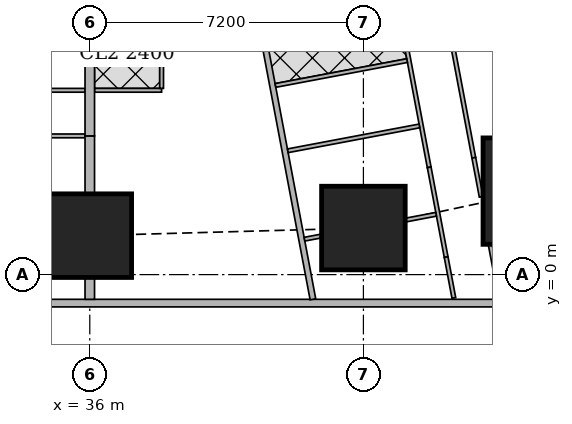
"""IFC4 building model, lengths in metres.
Left out: names, types, materials, properties, quantities, classifications, styles, units other than length and angle.
Written with IfcOpenShell. Run it as: python <this file> out.ifc"""

import sys

from ifc_helpers import new_model, si_unit, direction, frame, frame_2d, origin, origin_2d, place, context, subcontext, project, spatial, rectangle, extrude, element, fill, save


model = new_model("IFC4")
c1 = context("Model", 3, precision=1e-05, world=origin(), true_north=direction((0.0, 1.0)))
c2 = subcontext(c1, "Body", "Model", "MODEL_VIEW")
j1 = project(units=[si_unit("LENGTHUNIT", "METRE"), si_unit("PLANEANGLEUNIT", "RADIAN")], contexts=[c1])
p1 = place(None, origin())
s1 = spatial("IfcSite", under=j1, at=p1, CompositionType="ELEMENT")
p2 = place(p1, origin())
s2 = spatial("IfcBuilding", under=s1, at=p2, CompositionType="ELEMENT")
p3 = place(p2, frame((0.0, 0.0, 89.15)))
s3 = spatial("IfcBuildingStorey", under=s2, at=p3, CompositionType="ELEMENT", Elevation=89.15)
for number, where, z_axis, x_axis in (
    (1, (36.0, 1.025, 0.0), (0.0, 0.0, 1.0), (1.0, 0.0, 0.0)),
    (2, (43.2, 1.225, 0.0), (0.0, 0.0, 1.0), (1.0, 0.0, 0.0)),
):
    element("IfcColumn", number, at=place(p3, frame(where, z_axis=z_axis, x_axis=x_axis)), inside=s3, PredefinedType="COLUMN", context=c2, shape_type="SweptSolid", body=[
        extrude(rectangle(XDim=2.2, YDim=2.2, at=origin_2d()), origin(), (0.0, 0.0, 1.0), 3.75),
    ])
p4 = place(p3, frame((47.748, 2.197, 0.0), z_axis=(0.0, 0.0, 1.0), x_axis=(1.0, 0.0, 0.0)))
e3 = element("IfcColumn", 3, at=p4, inside=s3, PredefinedType="COLUMN", context=c2, shape_type="SweptSolid", body=[
    extrude(rectangle(XDim=2.8, YDim=2.8, at=origin_2d()), origin(), (0.0, 0.0, 1.0), 3.75),
])
p5 = place(p3, frame((2.163, -0.75, 0.0), z_axis=(0.0, 0.0, 1.0), x_axis=(1.0, 0.0, 0.0)))
e4 = element("IfcWall", 4, at=p5, inside=s3, PredefinedType="SOLIDWALL", context=c2, shape_type="SweptSolid", body=[
    extrude(rectangle(XDim=45.628, YDim=0.2, at=frame_2d((22.814, 0.0))), origin(), (0.0, 0.0, 1.0), 3.5),
])
p6 = place(p5, frame((9.537, 0.0, 0.9)))
e5 = element("IfcOpeningElement", 5, at=p6, cuts=e4, PredefinedType="OPENING", context=c2, shape_type="SweptSolid", body=[
    extrude(rectangle(XDim=1.8, YDim=1.5, at=frame_2d((0.9, 0.75))), frame((0.0, 0.11, 0.0), z_axis=(0.0, -1.0, 0.0), x_axis=(1.0, 0.0, 0.0)), (0.0, 0.0, 1.0), 0.22),
])
p7 = place(p5, frame((13.137, 0.0, 0.9)))
e6 = element("IfcOpeningElement", 6, at=p7, cuts=e4, PredefinedType="OPENING", context=c2, shape_type="SweptSolid", body=[
    extrude(rectangle(XDim=1.8, YDim=1.5, at=frame_2d((0.9, 0.75))), frame((0.0, 0.11, 0.0), z_axis=(0.0, -1.0, 0.0), x_axis=(1.0, 0.0, 0.0)), (0.0, 0.0, 1.0), 0.22),
])
p8 = place(p5, frame((16.737, 0.0, 0.9)))
e7 = element("IfcOpeningElement", 7, at=p8, cuts=e4, PredefinedType="OPENING", context=c2, shape_type="SweptSolid", body=[
    extrude(rectangle(XDim=1.8, YDim=1.5, at=frame_2d((0.9, 0.75))), frame((0.0, 0.11, 0.0), z_axis=(0.0, -1.0, 0.0), x_axis=(1.0, 0.0, 0.0)), (0.0, 0.0, 1.0), 0.22),
])
p9 = place(p5, frame((20.337, 0.0, 0.9)))
e8 = element("IfcOpeningElement", 8, at=p9, cuts=e4, PredefinedType="OPENING", context=c2, shape_type="SweptSolid", body=[
    extrude(rectangle(XDim=1.8, YDim=1.5, at=frame_2d((0.9, 0.75))), frame((0.0, 0.11, 0.0), z_axis=(0.0, -1.0, 0.0), x_axis=(1.0, 0.0, 0.0)), (0.0, 0.0, 1.0), 0.22),
])
p10 = place(p5, frame((23.937, 0.0, 0.9)))
e9 = element("IfcOpeningElement", 9, at=p10, cuts=e4, PredefinedType="OPENING", context=c2, shape_type="SweptSolid", body=[
    extrude(rectangle(XDim=1.8, YDim=1.5, at=frame_2d((0.9, 0.75))), frame((0.0, 0.11, 0.0), z_axis=(0.0, -1.0, 0.0), x_axis=(1.0, 0.0, 0.0)), (0.0, 0.0, 1.0), 0.22),
])
p11 = place(p5, frame((27.537, 0.0, 0.9)))
e10 = element("IfcOpeningElement", 10, at=p11, cuts=e4, PredefinedType="OPENING", context=c2, shape_type="SweptSolid", body=[
    extrude(rectangle(XDim=1.8, YDim=1.5, at=frame_2d((0.9, 0.75))), frame((0.0, 0.11, 0.0), z_axis=(0.0, -1.0, 0.0), x_axis=(1.0, 0.0, 0.0)), (0.0, 0.0, 1.0), 0.22),
])
p12 = place(p5, frame((31.137, 0.0, 0.9)))
e11 = element("IfcOpeningElement", 11, at=p12, cuts=e4, PredefinedType="OPENING", context=c2, shape_type="SweptSolid", body=[
    extrude(rectangle(XDim=1.8, YDim=1.5, at=frame_2d((0.9, 0.75))), frame((0.0, 0.11, 0.0), z_axis=(0.0, -1.0, 0.0), x_axis=(1.0, 0.0, 0.0)), (0.0, 0.0, 1.0), 0.22),
])
p13 = place(p5, frame((34.737, 0.0, 0.9)))
e12 = element("IfcOpeningElement", 12, at=p13, cuts=e4, PredefinedType="OPENING", context=c2, shape_type="SweptSolid", body=[
    extrude(rectangle(XDim=1.8, YDim=1.5, at=frame_2d((0.9, 0.75))), frame((0.0, 0.11, 0.0), z_axis=(0.0, -1.0, 0.0), x_axis=(1.0, 0.0, 0.0)), (0.0, 0.0, 1.0), 0.22),
])
p14 = place(p3, frame((50.653, 2.703, 0.0), z_axis=(0.0, 0.0, 1.0), x_axis=(-0.185612026696, 0.982623109613, 0.0)))
e13 = element("IfcWall", 13, at=p14, inside=s3, PredefinedType="SOLIDWALL", context=c2, shape_type="SweptSolid", body=[
    extrude(rectangle(XDim=41.393, YDim=0.2, at=frame_2d((20.697, 0.0))), origin(), (0.0, 0.0, 1.0), 3.5),
])
p15 = place(p14, frame((1.633, 0.0, 0.9)))
e14 = element("IfcOpeningElement", 14, at=p15, cuts=e13, PredefinedType="OPENING", context=c2, shape_type="SweptSolid", body=[
    extrude(rectangle(XDim=1.8, YDim=1.5, at=frame_2d((0.9, 0.75))), frame((0.0, 0.11, 0.0), z_axis=(0.0, -1.0, 0.0), x_axis=(1.0, 0.0, 0.0)), (0.0, 0.0, 1.0), 0.22),
])
p16 = place(p14, frame((6.032, 0.0, 0.9)))
e15 = element("IfcOpeningElement", 15, at=p16, cuts=e13, PredefinedType="OPENING", context=c2, shape_type="SweptSolid", body=[
    extrude(rectangle(XDim=1.8, YDim=1.5, at=frame_2d((0.9, 0.75))), frame((0.0, 0.11, 0.0), z_axis=(0.0, -1.0, 0.0), x_axis=(1.0, 0.0, 0.0)), (0.0, 0.0, 1.0), 0.22),
])
p17 = place(p14, frame((9.848, 0.0, 0.9)))
e16 = element("IfcOpeningElement", 16, at=p17, cuts=e13, PredefinedType="OPENING", context=c2, shape_type="SweptSolid", body=[
    extrude(rectangle(XDim=1.8, YDim=1.5, at=frame_2d((0.9, 0.75))), frame((0.0, 0.11, 0.0), z_axis=(0.0, -1.0, 0.0), x_axis=(1.0, 0.0, 0.0)), (0.0, 0.0, 1.0), 0.22),
])
p18 = place(p14, frame((13.664, 0.0, 0.9)))
e17 = element("IfcOpeningElement", 17, at=p18, cuts=e13, PredefinedType="OPENING", context=c2, shape_type="SweptSolid", body=[
    extrude(rectangle(XDim=1.8, YDim=1.5, at=frame_2d((0.9, 0.75))), frame((0.0, 0.11, 0.0), z_axis=(0.0, -1.0, 0.0), x_axis=(1.0, 0.0, 0.0)), (0.0, 0.0, 1.0), 0.22),
])
p19 = place(p14, frame((17.481, 0.0, 0.9)))
e18 = element("IfcOpeningElement", 18, at=p19, cuts=e13, PredefinedType="OPENING", context=c2, shape_type="SweptSolid", body=[
    extrude(rectangle(XDim=1.8, YDim=1.5, at=frame_2d((0.9, 0.75))), frame((0.0, 0.11, 0.0), z_axis=(0.0, -1.0, 0.0), x_axis=(1.0, 0.0, 0.0)), (0.0, 0.0, 1.0), 0.22),
])
p20 = place(p14, frame((21.297, 0.0, 0.9)))
e19 = element("IfcOpeningElement", 19, at=p20, cuts=e13, PredefinedType="OPENING", context=c2, shape_type="SweptSolid", body=[
    extrude(rectangle(XDim=1.8, YDim=1.5, at=frame_2d((0.9, 0.75))), frame((0.0, 0.11, 0.0), z_axis=(0.0, -1.0, 0.0), x_axis=(1.0, 0.0, 0.0)), (0.0, 0.0, 1.0), 0.22),
])
p21 = place(p14, frame((25.113, 0.0, 0.9)))
e20 = element("IfcOpeningElement", 20, at=p21, cuts=e13, PredefinedType="OPENING", context=c2, shape_type="SweptSolid", body=[
    extrude(rectangle(XDim=1.8, YDim=1.5, at=frame_2d((0.9, 0.75))), frame((0.0, 0.11, 0.0), z_axis=(0.0, -1.0, 0.0), x_axis=(1.0, 0.0, 0.0)), (0.0, 0.0, 1.0), 0.22),
])
p22 = place(p14, frame((28.93, 0.0, 0.9)))
e21 = element("IfcOpeningElement", 21, at=p22, cuts=e13, PredefinedType="OPENING", context=c2, shape_type="SweptSolid", body=[
    extrude(rectangle(XDim=1.8, YDim=1.5, at=frame_2d((0.9, 0.75))), frame((0.0, 0.11, 0.0), z_axis=(0.0, -1.0, 0.0), x_axis=(1.0, 0.0, 0.0)), (0.0, 0.0, 1.0), 0.22),
])
p23 = place(p14, frame((32.746, 0.0, 0.9)))
e22 = element("IfcOpeningElement", 22, at=p23, cuts=e13, PredefinedType="OPENING", context=c2, shape_type="SweptSolid", body=[
    extrude(rectangle(XDim=1.8, YDim=1.5, at=frame_2d((0.9, 0.75))), frame((0.0, 0.11, 0.0), z_axis=(0.0, -1.0, 0.0), x_axis=(1.0, 0.0, 0.0)), (0.0, 0.0, 1.0), 0.22),
])
p24 = place(p14, frame((36.481, 0.0, 0.9)))
e23 = element("IfcOpeningElement", 23, at=p24, cuts=e13, PredefinedType="OPENING", context=c2, shape_type="SweptSolid", body=[
    extrude(rectangle(XDim=1.8, YDim=1.5, at=frame_2d((0.9, 0.75))), frame((0.0, 0.11, 0.0), z_axis=(0.0, -1.0, 0.0), x_axis=(1.0, 0.0, 0.0)), (0.0, 0.0, 1.0), 0.22),
])
p25 = place(p3, frame((33.127, 45.65, 0.0), z_axis=(0.0, 0.0, 1.0), x_axis=(0.185598547723, -0.98262565562, 0.0)))
e24 = element("IfcWall", 24, at=p25, inside=s3, PredefinedType="SOLIDWALL", context=c2, shape_type="SweptSolid", body=[
    extrude(rectangle(XDim=47.118, YDim=0.15, at=frame_2d((23.559, 0.0))), origin(), (0.0, 0.0, 1.0), 2.2),
])
p26 = place(p25, frame((15.285, 0.0, 0.0)))
e25 = element("IfcOpeningElement", 25, at=p26, cuts=e24, PredefinedType="OPENING", context=c2, shape_type="SweptSolid", body=[
    extrude(rectangle(XDim=1.0, YDim=2.1, at=frame_2d((0.5, 1.05))), frame((0.0, 0.085, 0.0), z_axis=(0.0, -1.0, 0.0), x_axis=(1.0, 0.0, 0.0)), (0.0, 0.0, 1.0), 0.17),
])
p27 = place(p25, frame((19.102, 0.0, 0.0)))
e26 = element("IfcOpeningElement", 26, at=p27, cuts=e24, PredefinedType="OPENING", context=c2, shape_type="SweptSolid", body=[
    extrude(rectangle(XDim=1.0, YDim=2.1, at=frame_2d((0.5, 1.05))), frame((0.0, 0.085, 0.0), z_axis=(0.0, -1.0, 0.0), x_axis=(1.0, 0.0, 0.0)), (0.0, 0.0, 1.0), 0.17),
])
p28 = place(p25, frame((33.88, 0.0, 0.0)))
e27 = element("IfcOpeningElement", 27, at=p28, cuts=e24, PredefinedType="OPENING", context=c2, shape_type="SweptSolid", body=[
    extrude(rectangle(XDim=1.0, YDim=2.1, at=frame_2d((0.5, 1.05))), frame((0.0, 0.085, 0.0), z_axis=(0.0, -1.0, 0.0), x_axis=(1.0, 0.0, 0.0)), (0.0, 0.0, 1.0), 0.17),
])
p29 = place(p3, frame((35.875, 3.65, 0.0), z_axis=(0.0, 0.0, 1.0), x_axis=(-1.0, 0.0, 0.0)))
e28 = element("IfcWall", 28, at=p29, inside=s3, PredefinedType="PARTITIONING", context=c2, shape_type="SweptSolid", body=[
    extrude(rectangle(XDim=7.075, YDim=0.1, at=frame_2d((3.538, 0.0))), origin(), (0.0, 0.0, 1.0), 3.5),
])
p30 = place(p29, frame((5.975, 0.0, 0.0)))
e29 = element("IfcOpeningElement", 29, at=p30, cuts=e28, PredefinedType="OPENING", context=c2, shape_type="SweptSolid", body=[
    extrude(rectangle(XDim=0.9, YDim=2.1, at=frame_2d((0.45, 1.05))), frame((0.0, 0.06, 0.0), z_axis=(0.0, -1.0, 0.0), x_axis=(1.0, 0.0, 0.0)), (0.0, 0.0, 1.0), 0.12),
])
p31 = place(p29, frame((2.375, 0.0, 0.0)))
e30 = element("IfcOpeningElement", 30, at=p31, cuts=e28, PredefinedType="OPENING", context=c2, shape_type="SweptSolid", body=[
    extrude(rectangle(XDim=0.9, YDim=2.1, at=frame_2d((0.45, 1.05))), frame((0.0, 0.06, 0.0), z_axis=(0.0, -1.0, 0.0), x_axis=(1.0, 0.0, 0.0)), (0.0, 0.0, 1.0), 0.12),
])
p32 = place(p3, frame((35.875, 4.85, 0.0), z_axis=(0.0, 0.0, 1.0), x_axis=(-1.0, 0.0, 0.0)))
e31 = element("IfcWall", 31, at=p32, inside=s3, PredefinedType="PARTITIONING", context=c2, shape_type="SweptSolid", body=[
    extrude(rectangle(XDim=7.075, YDim=0.1, at=frame_2d((3.538, 0.0))), origin(), (0.0, 0.0, 1.0), 3.5),
])
p33 = place(p32, frame((5.6, 0.0, 0.0)))
e32 = element("IfcOpeningElement", 32, at=p33, cuts=e31, PredefinedType="OPENING", context=c2, shape_type="SweptSolid", body=[
    extrude(rectangle(XDim=0.9, YDim=2.1, at=frame_2d((0.45, 1.05))), frame((0.0, 0.06, 0.0), z_axis=(0.0, -1.0, 0.0), x_axis=(1.0, 0.0, 0.0)), (0.0, 0.0, 1.0), 0.12),
])
p34 = place(p32, frame((2.225, 0.0, 0.0)))
e33 = element("IfcOpeningElement", 33, at=p34, cuts=e31, PredefinedType="OPENING", context=c2, shape_type="SweptSolid", body=[
    extrude(rectangle(XDim=0.9, YDim=2.1, at=frame_2d((0.45, 1.05))), frame((0.0, 0.06, 0.0), z_axis=(0.0, -1.0, 0.0), x_axis=(1.0, 0.0, 0.0)), (0.0, 0.0, 1.0), 0.12),
])
p35 = place(p32, frame((3.8, 0.0, 0.0)))
e34 = element("IfcOpeningElement", 34, at=p35, cuts=e31, PredefinedType="OPENING", context=c2, shape_type="SweptSolid", body=[
    extrude(rectangle(XDim=0.9, YDim=2.1, at=frame_2d((0.45, 1.05))), frame((0.0, 0.06, 0.0), z_axis=(0.0, -1.0, 0.0), x_axis=(1.0, 0.0, 0.0)), (0.0, 0.0, 1.0), 0.12),
])
p36 = place(p32, frame((0.425, 0.0, 0.0)))
e35 = element("IfcOpeningElement", 35, at=p36, cuts=e31, PredefinedType="OPENING", context=c2, shape_type="SweptSolid", body=[
    extrude(rectangle(XDim=0.9, YDim=2.1, at=frame_2d((0.45, 1.05))), frame((0.0, 0.06, 0.0), z_axis=(0.0, -1.0, 0.0), x_axis=(1.0, 0.0, 0.0)), (0.0, 0.0, 1.0), 0.12),
])
p37 = place(p3, frame((37.89, 4.85, 0.0), z_axis=(0.0, 0.0, 1.0), x_axis=(-1.0, 0.0, 0.0)))
e36 = element("IfcWall", 36, at=p37, inside=s3, PredefinedType="PARTITIONING", context=c2, shape_type="SweptSolid", body=[
    extrude(rectangle(XDim=1.765, YDim=0.1, at=frame_2d((0.882, 0.0))), origin(), (0.0, 0.0, 1.0), 3.5),
])
p38 = place(p37, frame((0.49, 0.0, 0.0)))
e37 = element("IfcOpeningElement", 37, at=p38, cuts=e36, PredefinedType="OPENING", context=c2, shape_type="SweptSolid", body=[
    extrude(rectangle(XDim=0.9, YDim=2.1, at=frame_2d((0.45, 1.05))), frame((0.0, 0.06, 0.0), z_axis=(0.0, -1.0, 0.0), x_axis=(1.0, 0.0, 0.0)), (0.0, 0.0, 1.0), 0.12),
])
p39 = place(p3, frame((37.89, 4.9, 0.0), z_axis=(0.0, 0.0, 1.0), x_axis=(0.0, 1.0, 0.0)))
e38 = element("IfcWall", 38, at=p39, inside=s3, PredefinedType="PARTITIONING", context=c2, shape_type="SweptSolid", body=[
    extrude(rectangle(XDim=3.525, YDim=0.1, at=frame_2d((1.763, 0.0))), origin(), (0.0, 0.0, 1.0), 3.5),
])
p40 = place(p3, frame((36.0, -0.65, 0.0), z_axis=(0.0, 0.0, 1.0), x_axis=(0.0, 1.0, 0.0)))
e39 = element("IfcWall", 39, at=p40, inside=s3, PredefinedType="SOLIDWALL", context=c2, shape_type="SweptSolid", body=[
    extrude(rectangle(XDim=0.574, YDim=0.25, at=frame_2d((0.287, 0.0))), origin(), (0.0, 0.0, 1.0), 3.5),
])
p41 = place(p3, frame((36.0, 2.126, 0.0), z_axis=(0.0, 0.0, 1.0), x_axis=(0.0, 1.0, 0.0)))
e40 = element("IfcWall", 40, at=p41, inside=s3, PredefinedType="SOLIDWALL", context=c2, shape_type="SweptSolid", body=[
    extrude(rectangle(XDim=1.524, YDim=0.25, at=frame_2d((0.762, 0.0))), origin(), (0.0, 0.0, 1.0), 3.5),
])
p42 = place(p3, frame((36.0, 3.65, 0.0), z_axis=(0.0, 0.0, 1.0), x_axis=(0.0, 1.0, 0.0)))
e41 = element("IfcWall", 41, at=p42, inside=s3, PredefinedType="SOLIDWALL", context=c2, shape_type="SweptSolid", body=[
    extrude(rectangle(XDim=3.049, YDim=0.25, at=frame_2d((1.524, 0.0))), origin(), (0.0, 0.0, 1.0), 3.5),
])
p43 = place(p3, frame((44.727, 10.366, 0.0), z_axis=(0.0, 0.0, 1.0), x_axis=(0.185678775129, -0.982610498858, 0.0)))
e42 = element("IfcWall", 42, at=p43, inside=s3, PredefinedType="PARTITIONING", context=c2, shape_type="SweptSolid", body=[
    extrude(rectangle(XDim=7.421, YDim=0.1, at=frame_2d((3.71, 0.0))), origin(), (0.0, 0.0, 1.0), 3.5),
])
p44 = place(p43, frame((0.151, 0.0, 0.0)))
e43 = element("IfcOpeningElement", 43, at=p44, cuts=e42, PredefinedType="OPENING", context=c2, shape_type="SweptSolid", body=[
    extrude(rectangle(XDim=0.9, YDim=2.1, at=frame_2d((0.45, 1.05))), frame((0.0, 0.06, 0.0), z_axis=(0.0, -1.0, 0.0), x_axis=(1.0, 0.0, 0.0)), (0.0, 0.0, 1.0), 0.12),
])
p45 = place(p43, frame((4.55, 0.0, 0.0)))
e44 = element("IfcOpeningElement", 44, at=p45, cuts=e42, PredefinedType="OPENING", context=c2, shape_type="SweptSolid", body=[
    extrude(rectangle(XDim=0.9, YDim=2.1, at=frame_2d((0.45, 1.05))), frame((0.0, 0.06, 0.0), z_axis=(0.0, -1.0, 0.0), x_axis=(1.0, 0.0, 0.0)), (0.0, 0.0, 1.0), 0.12),
])
p46 = place(p3, frame((46.105, 3.074, 0.0), z_axis=(0.0, 0.0, 1.0), x_axis=(0.185897769544, -0.982569091351, 0.0)))
e45 = element("IfcWall", 45, at=p46, inside=s3, PredefinedType="PARTITIONING", context=c2, shape_type="SweptSolid", body=[
    extrude(rectangle(XDim=1.044, YDim=0.1, at=frame_2d((0.522, 0.0))), origin(), (0.0, 0.0, 1.0), 2.05),
])
p47 = place(p3, frame((46.537, 0.787, 0.0), z_axis=(0.0, 0.0, 1.0), x_axis=(0.185348284603, -0.982672892368, 0.0)))
e46 = element("IfcWall", 46, at=p47, inside=s3, PredefinedType="PARTITIONING", context=c2, shape_type="SweptSolid", body=[
    extrude(rectangle(XDim=1.419, YDim=0.1, at=frame_2d((0.709, 0.0))), origin(), (0.0, 0.0, 1.0), 2.05),
])
p48 = place(p3, frame((44.049, 7.49, 0.0), z_axis=(0.0, 0.0, 1.0), x_axis=(0.185666332607, -0.982612849975, 0.0)))
e47 = element("IfcWall", 47, at=p48, inside=s3, PredefinedType="PARTITIONING", context=c2, shape_type="SweptSolid", body=[
    extrude(rectangle(XDim=4.75, YDim=0.1, at=frame_2d((2.375, 0.0))), origin(), (0.0, 0.0, 1.0), 3.5),
])
p49 = place(p48, frame((0.8, 0.0, 0.0)))
e48 = element("IfcOpeningElement", 48, at=p49, cuts=e47, PredefinedType="OPENING", context=c2, shape_type="SweptSolid", body=[
    extrude(rectangle(XDim=0.9, YDim=2.1, at=frame_2d((0.45, 1.05))), frame((0.0, 0.06, 0.0), z_axis=(0.0, -1.0, 0.0), x_axis=(1.0, 0.0, 0.0)), (0.0, 0.0, 1.0), 0.12),
])
p50 = place(p48, frame((2.315, 0.0, 0.0)))
e49 = element("IfcOpeningElement", 49, at=p50, cuts=e47, PredefinedType="OPENING", context=c2, shape_type="SweptSolid", body=[
    extrude(rectangle(XDim=0.9, YDim=2.1, at=frame_2d((0.45, 1.05))), frame((0.0, 0.06, 0.0), z_axis=(0.0, -1.0, 0.0), x_axis=(1.0, 0.0, 0.0)), (0.0, 0.0, 1.0), 0.12),
])
p51 = place(p3, frame((44.931, 2.823, 0.0), z_axis=(0.0, 0.0, 1.0), x_axis=(0.185631845838, -0.982619365681, 0.0)))
e50 = element("IfcWall", 50, at=p51, inside=s3, PredefinedType="PARTITIONING", context=c2, shape_type="SweptSolid", body=[
    extrude(rectangle(XDim=2.403, YDim=0.1, at=frame_2d((1.201, 0.0))), origin(), (0.0, 0.0, 1.0), 2.05),
])
p52 = place(p3, frame((45.377, 0.462, 0.0), z_axis=(0.0, 0.0, 1.0), x_axis=(0.185513480919, -0.982641719243, 0.0)))
e51 = element("IfcWall", 51, at=p52, inside=s3, PredefinedType="PARTITIONING", context=c2, shape_type="SweptSolid", body=[
    extrude(rectangle(XDim=1.095, YDim=0.1, at=frame_2d((0.547, 0.0))), origin(), (0.0, 0.0, 1.0), 3.5),
])
p53 = place(p3, frame((45.114, 1.587, 0.0), z_axis=(0.0, 0.0, 1.0), x_axis=(-0.982624706348, -0.185603573443, 0.0)))
e52 = element("IfcWall", 52, at=p53, inside=s3, PredefinedType="PARTITIONING", context=c2, shape_type="SweptSolid", body=[
    extrude(rectangle(XDim=0.818, YDim=0.1, at=frame_2d((0.409, 0.0))), origin(), (0.0, 0.0, 1.0), 2.05),
])
p54 = place(p3, frame((42.09, 1.015, 0.0), z_axis=(0.0, 0.0, 1.0), x_axis=(-0.982680384557, -0.185308558375, 0.0)))
e53 = element("IfcWall", 53, at=p54, inside=s3, PredefinedType="PARTITIONING", context=c2, shape_type="SweptSolid", body=[
    extrude(rectangle(XDim=0.448, YDim=0.1, at=frame_2d((0.224, 0.0))), origin(), (0.0, 0.0, 1.0), 2.05),
])
p55 = place(p3, frame((44.35, 5.631, 0.0), z_axis=(0.0, 0.0, 1.0), x_axis=(-0.982638553676, -0.185530247748, 0.0)))
e54 = element("IfcWall", 54, at=p55, inside=s3, PredefinedType="PARTITIONING", context=c2, shape_type="SweptSolid", body=[
    extrude(rectangle(XDim=3.525, YDim=0.1, at=frame_2d((1.763, 0.0))), origin(), (0.0, 0.0, 1.0), 3.5),
])
p56 = place(p3, frame((41.21, 3.258, 0.0), z_axis=(0.0, 0.0, 1.0), x_axis=(0.982638553676, 0.185530247748, 0.0)))
e55 = element("IfcWall", 55, at=p56, inside=s3, PredefinedType="PARTITIONING", context=c2, shape_type="SweptSolid", body=[
    extrude(rectangle(XDim=3.525, YDim=0.1, at=frame_2d((1.763, 0.0))), origin(), (0.0, 0.0, 1.0), 3.5),
])
p57 = place(p56, frame((1.65, 0.0, 0.0)))
e56 = element("IfcOpeningElement", 56, at=p57, cuts=e55, PredefinedType="OPENING", context=c2, shape_type="SweptSolid", body=[
    extrude(rectangle(XDim=0.9, YDim=2.1, at=frame_2d((0.45, 1.05))), frame((0.0, 0.06, 0.0), z_axis=(0.0, -1.0, 0.0), x_axis=(1.0, 0.0, 0.0)), (0.0, 0.0, 1.0), 0.12),
])
p58 = place(p12, origin())
e57 = element("IfcWindow", 57, at=p58, inside=s3, PartitioningType="SINGLE_PANEL", PredefinedType="WINDOW", context=c2, shape_type="SweptSolid", body=[
    extrude(rectangle(XDim=1.8, YDim=1.5, at=frame_2d((0.9, 0.75))), frame((0.0, 0.03, 0.0), z_axis=(0.0, -1.0, 0.0), x_axis=(1.0, 0.0, 0.0)), (0.0, 0.0, 1.0), 0.06),
])
fill(e11, e57)
p59 = place(p13, origin())
e58 = element("IfcWindow", 58, at=p59, inside=s3, PartitioningType="SINGLE_PANEL", PredefinedType="WINDOW", context=c2, shape_type="SweptSolid", body=[
    extrude(rectangle(XDim=1.8, YDim=1.5, at=frame_2d((0.9, 0.75))), frame((0.0, 0.03, 0.0), z_axis=(0.0, -1.0, 0.0), x_axis=(1.0, 0.0, 0.0)), (0.0, 0.0, 1.0), 0.06),
])
fill(e12, e58)
p60 = place(p36, origin())
e59 = element("IfcDoor", 59, at=p60, inside=s3, OperationType="SINGLE_SWING_RIGHT", PredefinedType="DOOR", context=c2, shape_type="SweptSolid", body=[
    extrude(rectangle(XDim=0.9, YDim=2.1, at=frame_2d((0.45, 1.05))), frame((0.0, 0.025, 0.0), z_axis=(0.0, -1.0, 0.0), x_axis=(1.0, 0.0, 0.0)), (0.0, 0.0, 1.0), 0.05),
])
fill(e35, e59)
p61 = place(p38, origin())
e60 = element("IfcDoor", 60, at=p61, inside=s3, OperationType="SINGLE_SWING_LEFT", PredefinedType="DOOR", context=c2, shape_type="SweptSolid", body=[
    extrude(rectangle(XDim=0.9, YDim=2.1, at=frame_2d((0.45, 1.05))), frame((0.0, 0.025, 0.0), z_axis=(0.0, -1.0, 0.0), x_axis=(1.0, 0.0, 0.0)), (0.0, 0.0, 1.0), 0.05),
])
fill(e37, e60)
p62 = place(p45, origin())
e61 = element("IfcDoor", 61, at=p62, inside=s3, OperationType="SINGLE_SWING_LEFT", PredefinedType="DOOR", context=c2, shape_type="SweptSolid", body=[
    extrude(rectangle(XDim=0.9, YDim=2.1, at=frame_2d((0.45, 1.05))), frame((0.0, 0.025, 0.0), z_axis=(0.0, -1.0, 0.0), x_axis=(1.0, 0.0, 0.0)), (0.0, 0.0, 1.0), 0.05),
])
fill(e44, e61)
p63 = place(p49, origin())
e62 = element("IfcDoor", 62, at=p63, inside=s3, OperationType="SINGLE_SWING_LEFT", PredefinedType="DOOR", context=c2, shape_type="SweptSolid", body=[
    extrude(rectangle(XDim=0.9, YDim=2.1, at=frame_2d((0.45, 1.05))), frame((0.0, 0.025, 0.0), z_axis=(0.0, -1.0, 0.0), x_axis=(1.0, 0.0, 0.0)), (0.0, 0.0, 1.0), 0.05),
])
fill(e48, e62)
p64 = place(p50, origin())
e63 = element("IfcDoor", 63, at=p64, inside=s3, OperationType="SINGLE_SWING_LEFT", PredefinedType="DOOR", context=c2, shape_type="SweptSolid", body=[
    extrude(rectangle(XDim=0.9, YDim=2.1, at=frame_2d((0.45, 1.05))), frame((0.0, 0.025, 0.0), z_axis=(0.0, -1.0, 0.0), x_axis=(1.0, 0.0, 0.0)), (0.0, 0.0, 1.0), 0.05),
])
fill(e49, e63)
p65 = place(p57, origin())
e64 = element("IfcDoor", 64, at=p65, inside=s3, OperationType="SINGLE_SWING_RIGHT", PredefinedType="DOOR", context=c2, shape_type="SweptSolid", body=[
    extrude(rectangle(XDim=0.9, YDim=2.1, at=frame_2d((0.45, 1.05))), frame((0.0, 0.025, 0.0), z_axis=(0.0, -1.0, 0.0), x_axis=(1.0, 0.0, 0.0)), (0.0, 0.0, 1.0), 0.05),
])
fill(e56, e64)
save(model, sys.argv[1])
